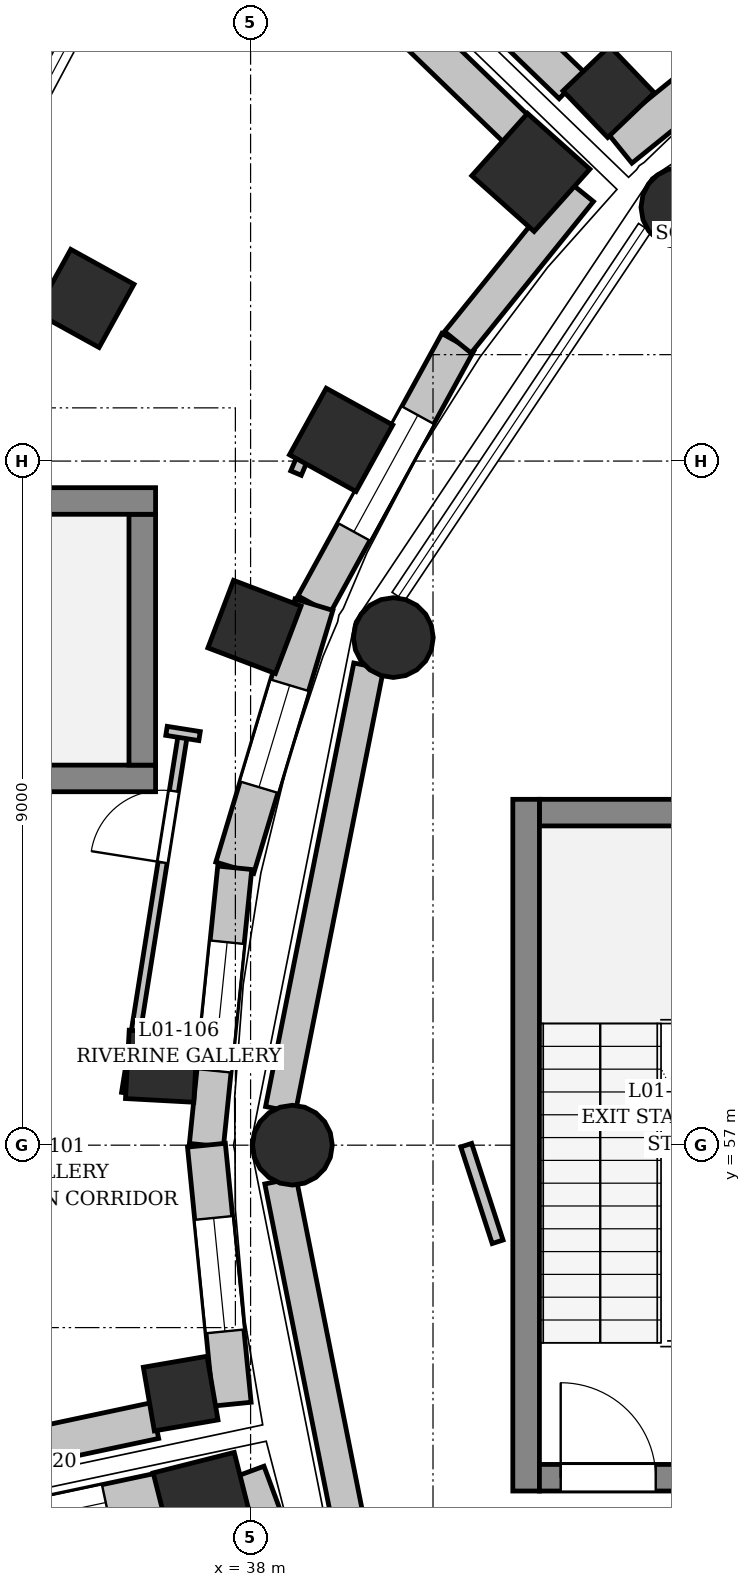
"""IFC4 building model, lengths in metres.
Left out: names, types, materials, properties, quantities, classifications, styles, units other than length and angle.
Written with IfcOpenShell. Run it as: python <this file> out.ifc"""

import sys

from ifc_helpers import new_model, si_unit, direction, frame, frame_2d, origin, origin_2d, place, context, subcontext, project, spatial, rectangle, circle, extrude, element, fill, save


model = new_model("IFC4")
c1 = context("Model", 3, precision=1e-05, world=origin(), true_north=direction((0.0, 1.0)))
c2 = subcontext(c1, "Body", "Model", "MODEL_VIEW")
j1 = project(units=[si_unit("LENGTHUNIT", "METRE"), si_unit("PLANEANGLEUNIT", "RADIAN")], contexts=[c1])
p1 = place(None, origin())
s1 = spatial("IfcSite", under=j1, at=p1, CompositionType="ELEMENT")
p2 = place(p1, origin())
s2 = spatial("IfcBuilding", under=s1, at=p2, CompositionType="ELEMENT")
p3 = place(p2, origin())
s3 = spatial("IfcBuildingStorey", under=s2, at=p3, CompositionType="ELEMENT", Elevation=0.0)
for number, where, z_axis, x_axis in (
    (1, (43.661, 69.339, 0.0), (0.0, 0.0, 1.0), (-0.707, 0.707, 0.0)),
    (2, (39.878, 63.678, 0.0), (0.0, 0.0, 1.0), (-0.924, 0.383, 0.0)),
    (3, (38.55, 57.0, 0.0), (0.0, 0.0, 1.0), (-1.0, 0.0, 0.0)),
):
    element("IfcColumn", number, at=place(p3, frame(where, z_axis=z_axis, x_axis=x_axis)), inside=s3, PredefinedType="COLUMN", context=c2, shape_type="SweptSolid", body=[
        extrude(circle(Radius=0.525, at=origin_2d()), origin(), (0.0, 0.0, 1.0), 5.05),
    ])
p4 = place(p3, frame((37.387, 52.29, 0.0), z_axis=(0.0, 0.0, 1.0), x_axis=(-0.969445349895, -0.245307385879, 0.0)))
e4 = element("IfcColumn", 4, at=p4, inside=s3, PredefinedType="COLUMN", context=c2, shape_type="SweptSolid", body=[
    extrude(rectangle(XDim=1.1, YDim=1.1, at=origin_2d()), origin(), (0.0, 0.0, 1.0), 5.12),
])
p5 = place(p3, frame((41.687, 69.797, 0.0), z_axis=(0.0, 0.0, 1.0), x_axis=(-0.745475999683, 0.666532470249, 0.0)))
e5 = element("IfcColumn", 5, at=p5, inside=s3, PredefinedType="COLUMN", context=c2, shape_type="SweptSolid", body=[
    extrude(rectangle(XDim=1.1, YDim=1.1, at=origin_2d()), origin(), (0.0, 0.0, 1.0), 5.1),
])
p6 = place(p3, frame((39.191, 66.279, 0.0), z_axis=(0.0, 0.0, 1.0), x_axis=(-0.875464527, 0.483282383255, 0.0)))
e6 = element("IfcColumn", 6, at=p6, inside=s3, PredefinedType="COLUMN", context=c2, shape_type="SweptSolid", body=[
    extrude(rectangle(XDim=1.0, YDim=1.0, at=origin_2d()), origin(), (0.0, 0.0, 1.0), 5.1),
])
for number, where, z_axis, x_axis in (
    (7, (35.821, 68.14, 0.0), (0.0, 0.0, 1.0), (-0.875, 0.483, 0.0)),
    (8, (38.051, 63.818, 0.0), (0.0, 0.0, 1.0), (-0.935, 0.355, 0.0)),
):
    element("IfcColumn", number, at=place(p3, frame(where, z_axis=z_axis, x_axis=x_axis)), inside=s3, PredefinedType="COLUMN", context=c2, shape_type="SweptSolid", body=[
        extrude(rectangle(XDim=0.95, YDim=0.95, at=origin_2d()), origin(), (0.0, 0.0, 1.0), 5.1),
    ])
p7 = place(p3, frame((36.828, 58.038, 0.0), z_axis=(0.0, 0.0, 1.0), x_axis=(-0.998536670326, 0.054078812985, 0.0)))
e9 = element("IfcColumn", 9, at=p7, inside=s3, PredefinedType="COLUMN", context=c2, shape_type="SweptSolid", body=[
    extrude(rectangle(XDim=0.9, YDim=0.9, at=origin_2d()), origin(), (0.0, 0.0, 1.0), 5.1),
])
for number, where, z_axis, x_axis in (
    (10, (37.08, 53.732, 0.0), (0.0, 0.0, 1.0), (-0.985, -0.17, 0.0)),
    (11, (42.711, 70.858, 0.0), (0.0, 0.0, 1.0), (-0.692, 0.722, 0.0)),
):
    element("IfcColumn", number, at=place(p3, frame(where, z_axis=z_axis, x_axis=x_axis)), inside=s3, PredefinedType="COLUMN", context=c2, shape_type="SweptSolid", body=[
        extrude(rectangle(XDim=0.85, YDim=0.85, at=origin_2d()), origin(), (0.0, 0.0, 1.0), 5.1),
    ])
p8 = place(p3, frame((38.393, 57.469, 0.0), z_axis=(0.0, 0.0, 1.0), x_axis=(0.19507439879, 0.980788447596, 0.0)))
e12 = element("IfcWall", 12, at=p8, inside=s3, PredefinedType="SOLIDWALL", context=c2, shape_type="SweptSolid", body=[
    extrude(rectangle(XDim=5.95, YDim=0.4, at=frame_2d((2.975, 0.0))), origin(), (0.0, 0.0, 1.0), 4.55),
])
p9 = place(p3, frame((39.554, 50.696, 0.0), z_axis=(0.0, 0.0, 1.0), x_axis=(-0.19507439879, 0.980788447596, 0.0)))
e13 = element("IfcWall", 13, at=p9, inside=s3, PredefinedType="SOLIDWALL", context=c2, shape_type="SweptSolid", body=[
    extrude(rectangle(XDim=5.95, YDim=0.42, at=frame_2d((2.975, 0.0))), origin(), (0.0, 0.0, 1.0), 4.54),
])
p10 = place(p3, frame((37.951, 52.693, 0.0), z_axis=(0.0, 0.0, 1.0), x_axis=(0.346456169042, -0.938066161277, 0.0)))
e14 = element("IfcWall", 14, at=p10, inside=s3, PredefinedType="SOLIDWALL", context=c2, shape_type="SweptSolid", body=[
    extrude(rectangle(XDim=4.55, YDim=0.48, at=frame_2d((2.275, 0.0))), origin(), (0.0, 0.0, 1.0), 5.12),
])
p11 = place(p10, frame((2.205, 0.0, 0.9)))
e15 = element("IfcOpeningElement", 15, at=p11, cuts=e14, PredefinedType="OPENING", context=c2, shape_type="SweptSolid", body=[
    extrude(rectangle(XDim=1.7, YDim=1.55, at=frame_2d((0.85, 0.775))), frame((0.0, 0.25, 0.0), z_axis=(0.0, -1.0, 0.0), x_axis=(1.0, 0.0, 0.0)), (0.0, 0.0, 1.0), 0.5),
])
p12 = place(p3, frame((34.01, 51.856, 0.0), z_axis=(0.0, 0.0, 1.0), x_axis=(0.97815429803, 0.207880180021, 0.0)))
e16 = element("IfcWall", 16, at=p12, inside=s3, PredefinedType="SOLIDWALL", context=c2, shape_type="SweptSolid", body=[
    extrude(rectangle(XDim=2.862, YDim=0.48, at=frame_2d((1.431, 0.0))), origin(), (0.0, 0.0, 1.0), 3.91),
])
p13 = place(p12, frame((0.731, 0.0, 0.9)))
e17 = element("IfcOpeningElement", 17, at=p13, cuts=e16, PredefinedType="OPENING", context=c2, shape_type="SweptSolid", body=[
    extrude(rectangle(XDim=1.4, YDim=2.05, at=frame_2d((0.7, 1.025))), frame((0.0, 0.25, 0.0), z_axis=(0.0, -1.0, 0.0), x_axis=(1.0, 0.0, 0.0)), (0.0, 0.0, 1.0), 0.5),
])
p14 = place(p3, frame((40.726, 67.563, 0.0), z_axis=(0.0, 0.0, 1.0), x_axis=(-0.480801851499, -0.876829276196, 0.0)))
e18 = element("IfcWall", 18, at=p14, inside=s3, PredefinedType="SOLIDWALL", context=c2, shape_type="SweptSolid", body=[
    extrude(rectangle(XDim=3.937, YDim=0.48, at=frame_2d((1.968, 0.0))), origin(), (0.0, 0.0, 1.0), 5.1),
])
p15 = place(p14, frame((1.094, 0.0, 0.9)))
e19 = element("IfcOpeningElement", 19, at=p15, cuts=e18, PredefinedType="OPENING", context=c2, shape_type="SweptSolid", body=[
    extrude(rectangle(XDim=1.75, YDim=1.85, at=frame_2d((0.875, 0.925))), frame((0.0, 0.25, 0.0), z_axis=(0.0, -1.0, 0.0), x_axis=(1.0, 0.0, 0.0)), (0.0, 0.0, 1.0), 0.5),
])
p16 = place(p3, frame((38.833, 64.111, 0.0), z_axis=(0.0, 0.0, 1.0), x_axis=(-0.288190467342, -0.957573106626, 0.0)))
e20 = element("IfcWall", 20, at=p16, inside=s3, PredefinedType="SOLIDWALL", context=c2, shape_type="SweptSolid", body=[
    extrude(rectangle(XDim=3.615, YDim=0.52, at=frame_2d((1.807, 0.0))), origin(), (0.0, 0.0, 1.0), 4.44),
])
p17 = place(p16, frame((1.107, 0.0, 0.9)))
e21 = element("IfcOpeningElement", 21, at=p17, cuts=e20, PredefinedType="OPENING", context=c2, shape_type="SweptSolid", body=[
    extrude(rectangle(XDim=1.4, YDim=2.05, at=frame_2d((0.7, 1.025))), frame((0.0, 0.27, 0.0), z_axis=(0.0, -1.0, 0.0), x_axis=(1.0, 0.0, 0.0)), (0.0, 0.0, 1.0), 0.54),
])
p18 = place(p3, frame((37.792, 60.649, 0.0), z_axis=(0.0, 0.0, 1.0), x_axis=(-0.101618529077, -0.994823438882, 0.0)))
e22 = element("IfcWall", 22, at=p18, inside=s3, PredefinedType="SOLIDWALL", context=c2, shape_type="SweptSolid", body=[
    extrude(rectangle(XDim=3.669, YDim=0.45, at=frame_2d((1.834, 0.0))), origin(), (0.0, 0.0, 1.0), 4.44),
])
p19 = place(p18, frame((0.984, 0.0, 0.9)))
e23 = element("IfcOpeningElement", 23, at=p19, cuts=e22, PredefinedType="OPENING", context=c2, shape_type="SweptSolid", body=[
    extrude(rectangle(XDim=1.7, YDim=1.55, at=frame_2d((0.85, 0.775))), frame((0.0, 0.235, 0.0), z_axis=(0.0, -1.0, 0.0), x_axis=(1.0, 0.0, 0.0)), (0.0, 0.0, 1.0), 0.47),
])
p20 = place(p3, frame((37.419, 57.0, 0.0), z_axis=(0.0, 0.0, 1.0), x_axis=(0.09912244439, -0.995075243898, 0.0)))
e24 = element("IfcWall", 24, at=p20, inside=s3, PredefinedType="SOLIDWALL", context=c2, shape_type="SweptSolid", body=[
    extrude(rectangle(XDim=3.424, YDim=0.5, at=frame_2d((1.712, 0.0))), origin(), (0.0, 0.0, 1.0), 5.1),
])
p21 = place(p20, frame((0.962, 0.0, 0.9)))
e25 = element("IfcOpeningElement", 25, at=p21, cuts=e24, PredefinedType="OPENING", context=c2, shape_type="SweptSolid", body=[
    extrude(rectangle(XDim=1.5, YDim=2.1, at=frame_2d((0.75, 1.05))), frame((0.0, 0.26, 0.0), z_axis=(0.0, -1.0, 0.0), x_axis=(1.0, 0.0, 0.0)), (0.0, 0.0, 1.0), 0.52),
])
p22 = place(p3, frame((36.741, 53.377, 0.0), z_axis=(0.0, 0.0, 1.0), x_axis=(-0.978142239511, -0.207936911788, 0.0)))
e26 = element("IfcWall", 26, at=p22, inside=s3, PredefinedType="SOLIDWALL", context=c2, shape_type="SweptSolid", body=[
    extrude(rectangle(XDim=7.248, YDim=0.48, at=frame_2d((3.624, 0.0))), origin(), (0.0, 0.0, 1.0), 4.19),
])
p23 = place(p22, frame((3.504, 0.0, 0.9)))
e27 = element("IfcOpeningElement", 27, at=p23, cuts=e26, PredefinedType="OPENING", context=c2, shape_type="SweptSolid", body=[
    extrude(rectangle(XDim=1.8, YDim=2.1, at=frame_2d((0.9, 1.05))), frame((0.0, 0.25, 0.0), z_axis=(0.0, -1.0, 0.0), x_axis=(1.0, 0.0, 0.0)), (0.0, 0.0, 1.0), 0.5),
])
p24 = place(p3, frame((39.438, 72.354, 0.0), z_axis=(0.0, 0.0, 1.0), x_axis=(0.719325028511, -0.694673666809, 0.0)))
e28 = element("IfcWall", 28, at=p24, inside=s3, PredefinedType="SOLIDWALL", context=c2, shape_type="SweptSolid", body=[
    extrude(rectangle(XDim=2.862, YDim=0.48, at=frame_2d((1.431, 0.0))), origin(), (0.0, 0.0, 1.0), 3.89),
])
p25 = place(p3, frame((42.336, 69.556, 0.0), z_axis=(0.0, 0.0, 1.0), x_axis=(-0.6281751712, -0.77807194673, 0.0)))
e29 = element("IfcWall", 29, at=p25, inside=s3, PredefinedType="SOLIDWALL", context=c2, shape_type="SweptSolid", body=[
    extrude(rectangle(XDim=2.562, YDim=0.45, at=frame_2d((1.281, 0.0))), origin(), (0.0, 0.0, 1.0), 5.1),
])
p26 = place(p3, frame((42.226, 70.94, 0.0), z_axis=(0.0, 0.0, 1.0), x_axis=(-0.719340699073, 0.694657439791, 0.0)))
e30 = element("IfcWall", 30, at=p26, inside=s3, PredefinedType="SOLIDWALL", context=c2, shape_type="SweptSolid", body=[
    extrude(rectangle(XDim=11.909, YDim=0.48, at=frame_2d((5.954, 0.0))), origin(), (0.0, 0.0, 1.0), 4.19),
])
p27 = place(p26, frame((4.234, 0.0, 0.9)))
e31 = element("IfcOpeningElement", 31, at=p27, cuts=e30, PredefinedType="OPENING", context=c2, shape_type="SweptSolid", body=[
    extrude(rectangle(XDim=1.4, YDim=2.05, at=frame_2d((0.7, 1.025))), frame((0.0, 0.25, 0.0), z_axis=(0.0, -1.0, 0.0), x_axis=(1.0, 0.0, 0.0)), (0.0, 0.0, 1.0), 0.5),
])
p28 = place(p26, frame((7.054, 0.0, 0.9)))
e32 = element("IfcOpeningElement", 32, at=p28, cuts=e30, PredefinedType="OPENING", context=c2, shape_type="SweptSolid", body=[
    extrude(rectangle(XDim=1.4, YDim=2.05, at=frame_2d((0.7, 1.025))), frame((0.0, 0.25, 0.0), z_axis=(0.0, -1.0, 0.0), x_axis=(1.0, 0.0, 0.0)), (0.0, 0.0, 1.0), 0.5),
])
p29 = place(p3, frame((45.886, 72.574, 0.0), z_axis=(0.0, 0.0, 1.0), x_axis=(-0.777517372915, -0.628861459159, 0.0)))
e33 = element("IfcWall", 33, at=p29, inside=s3, PredefinedType="SOLIDWALL", context=c2, shape_type="SweptSolid", body=[
    extrude(rectangle(XDim=3.9, YDim=0.52, at=frame_2d((1.95, 0.0))), origin(), (0.0, 0.0, 1.0), 5.1),
])
p30 = place(p29, frame((1.098, 0.0, 0.9)))
e34 = element("IfcOpeningElement", 34, at=p30, cuts=e33, PredefinedType="OPENING", context=c2, shape_type="SweptSolid", body=[
    extrude(rectangle(XDim=1.55, YDim=1.85, at=frame_2d((0.775, 0.925))), frame((0.0, 0.27, 0.0), z_axis=(0.0, -1.0, 0.0), x_axis=(1.0, 0.0, 0.0)), (0.0, 0.0, 1.0), 0.54),
])
p31 = place(p3, frame((45.2, 61.375, 0.0), z_axis=(0.0, 0.0, 1.0), x_axis=(-1.0, 0.0, 0.0)))
e35 = element("IfcWall", 35, at=p31, inside=s3, PredefinedType="SHEAR", context=c2, shape_type="SweptSolid", body=[
    extrude(rectangle(XDim=3.4, YDim=0.35, at=frame_2d((1.7, 0.0))), origin(), (0.0, 0.0, 1.0), 5.05),
])
p32 = place(p3, frame((41.625, 61.55, 0.0), z_axis=(0.0, 0.0, 1.0), x_axis=(0.0, -1.0, 0.0)))
e36 = element("IfcWall", 36, at=p32, inside=s3, PredefinedType="SHEAR", context=c2, shape_type="SweptSolid", body=[
    extrude(rectangle(XDim=9.1, YDim=0.35, at=frame_2d((4.55, 0.0))), origin(), (0.0, 0.0, 1.0), 5.05),
])
p33 = place(p3, frame((41.8, 52.625, 0.0), z_axis=(0.0, 0.0, 1.0), x_axis=(1.0, 0.0, 0.0)))
e37 = element("IfcWall", 37, at=p33, inside=s3, PredefinedType="SHEAR", context=c2, shape_type="SweptSolid", body=[
    extrude(rectangle(XDim=3.4, YDim=0.35, at=frame_2d((1.7, 0.0))), origin(), (0.0, 0.0, 1.0), 5.05),
])
p34 = place(p33, frame((0.28, 0.0, 0.0)))
e38 = element("IfcOpeningElement", 38, at=p34, cuts=e37, PredefinedType="OPENING", context=c2, shape_type="SweptSolid", body=[
    extrude(rectangle(XDim=1.25, YDim=2.2, at=frame_2d((0.625, 1.1))), frame((0.0, 0.185, 0.0), z_axis=(0.0, -1.0, 0.0), x_axis=(1.0, 0.0, 0.0)), (0.0, 0.0, 1.0), 0.37),
])
p35 = place(p3, frame((27.65, 61.825, 0.0), z_axis=(0.0, 0.0, 1.0), x_axis=(1.0, 0.0, 0.0)))
e39 = element("IfcWall", 39, at=p35, inside=s3, PredefinedType="SHEAR", context=c2, shape_type="SweptSolid", body=[
    extrude(rectangle(XDim=9.1, YDim=0.35, at=frame_2d((4.55, 0.0))), origin(), (0.0, 0.0, 1.0), 5.1),
])
p36 = place(p3, frame((36.575, 62.0, 0.0), z_axis=(0.0, 0.0, 1.0), x_axis=(0.0, 1.0, 0.0)))
e40 = element("IfcWall", 40, at=p36, inside=s3, PredefinedType="SHEAR", context=c2, shape_type="SweptSolid", body=[
    extrude(rectangle(XDim=3.3, YDim=0.35, at=frame_2d((1.65, 0.0))), origin(), (0.0, 0.0, 1.0), 5.1),
])
p37 = place(p3, frame((36.75, 65.475, 0.0), z_axis=(0.0, 0.0, 1.0), x_axis=(-1.0, 0.0, 0.0)))
e41 = element("IfcWall", 41, at=p37, inside=s3, PredefinedType="SHEAR", context=c2, shape_type="SweptSolid", body=[
    extrude(rectangle(XDim=9.1, YDim=0.35, at=frame_2d((4.55, 0.0))), origin(), (0.0, 0.0, 1.0), 5.1),
])
p38 = place(p3, frame((41.25, 55.729, 0.0), z_axis=(0.0, 0.0, 1.0), x_axis=(-0.30898696848, 0.951066271776, 0.0)))
e42 = element("IfcWall", 42, at=p38, inside=s3, PredefinedType="PARTITIONING", context=c2, shape_type="SweptSolid", body=[
    extrude(rectangle(XDim=1.337, YDim=0.15, at=frame_2d((0.668, 0.0))), origin(), (0.0, 0.0, 1.0), 4.95),
])
p39 = place(p3, frame((36.362, 57.686, 0.0), z_axis=(0.0, 0.0, 1.0), x_axis=(0.156391852422, 0.987695088829, 0.0)))
e43 = element("IfcWall", 43, at=p39, inside=s3, PredefinedType="PARTITIONING", context=c2, shape_type="SweptSolid", body=[
    extrude(rectangle(XDim=4.789, YDim=0.12, at=frame_2d((2.395, 0.0))), origin(), (0.0, 0.0, 1.0), 4.09),
])
p40 = place(p39, frame((3.072, 0.0, 0.0)))
e44 = element("IfcOpeningElement", 44, at=p40, cuts=e43, PredefinedType="OPENING", context=c2, shape_type="SweptSolid", body=[
    extrude(rectangle(XDim=0.95, YDim=2.2, at=frame_2d((0.475, 1.1))), frame((0.0, 0.07, 0.0), z_axis=(0.0, -1.0, 0.0), x_axis=(1.0, 0.0, 0.0)), (0.0, 0.0, 1.0), 0.14),
])
p41 = place(p3, frame((39.009, 66.81, 0.0), z_axis=(0.0, 0.0, 1.0), x_axis=(-0.390722739326, -0.920508414396, 0.0)))
e45 = element("IfcWall", 45, at=p41, inside=s3, PredefinedType="PARTITIONING", context=c2, shape_type="SweptSolid", body=[
    extrude(rectangle(XDim=1.052, YDim=0.15, at=frame_2d((0.526, 0.0))), origin(), (0.0, 0.0, 1.0), 3.99),
])
p42 = place(p3, frame((37.329, 62.382, 0.0), z_axis=(0.0, 0.0, 1.0), x_axis=(-0.987695424831, 0.156389730378, 0.0)))
e46 = element("IfcWall", 46, at=p42, inside=s3, PredefinedType="PARTITIONING", context=c2, shape_type="SweptSolid", body=[
    extrude(rectangle(XDim=0.44, YDim=0.12, at=frame_2d((0.22, 0.0))), origin(), (0.0, 0.0, 1.0), 5.1),
])
p43 = place(p13, origin())
e47 = element("IfcWindow", 47, at=p43, inside=s3, PartitioningType="DOUBLE_PANEL_VERTICAL", PredefinedType="WINDOW", context=c2, shape_type="SweptSolid", body=[
    extrude(rectangle(XDim=1.4, YDim=2.05, at=frame_2d((0.7, 1.025))), frame((0.0, 0.03, 0.0), z_axis=(0.0, -1.0, 0.0), x_axis=(1.0, 0.0, 0.0)), (0.0, 0.0, 1.0), 0.06),
])
fill(e17, e47)
p44 = place(p15, origin())
e48 = element("IfcWindow", 48, at=p44, inside=s3, PartitioningType="DOUBLE_PANEL_VERTICAL", PredefinedType="WINDOW", context=c2, shape_type="SweptSolid", body=[
    extrude(rectangle(XDim=1.75, YDim=1.85, at=frame_2d((0.875, 0.925))), frame((0.0, 0.03, 0.0), z_axis=(0.0, -1.0, 0.0), x_axis=(1.0, 0.0, 0.0)), (0.0, 0.0, 1.0), 0.06),
])
fill(e19, e48)
p45 = place(p17, origin())
e49 = element("IfcWindow", 49, at=p45, inside=s3, PartitioningType="DOUBLE_PANEL_VERTICAL", PredefinedType="WINDOW", context=c2, shape_type="SweptSolid", body=[
    extrude(rectangle(XDim=1.4, YDim=2.05, at=frame_2d((0.7, 1.025))), frame((0.0, 0.03, 0.0), z_axis=(0.0, -1.0, 0.0), x_axis=(1.0, 0.0, 0.0)), (0.0, 0.0, 1.0), 0.06),
])
fill(e21, e49)
p46 = place(p19, origin())
e50 = element("IfcWindow", 50, at=p46, inside=s3, PartitioningType="DOUBLE_PANEL_VERTICAL", PredefinedType="WINDOW", context=c2, shape_type="SweptSolid", body=[
    extrude(rectangle(XDim=1.7, YDim=1.55, at=frame_2d((0.85, 0.775))), frame((0.0, 0.03, 0.0), z_axis=(0.0, -1.0, 0.0), x_axis=(1.0, 0.0, 0.0)), (0.0, 0.0, 1.0), 0.06),
])
fill(e23, e50)
p47 = place(p21, origin())
e51 = element("IfcWindow", 51, at=p47, inside=s3, PartitioningType="DOUBLE_PANEL_VERTICAL", PredefinedType="WINDOW", context=c2, shape_type="SweptSolid", body=[
    extrude(rectangle(XDim=1.5, YDim=2.1, at=frame_2d((0.75, 1.05))), frame((0.0, 0.03, 0.0), z_axis=(0.0, -1.0, 0.0), x_axis=(1.0, 0.0, 0.0)), (0.0, 0.0, 1.0), 0.06),
])
fill(e25, e51)
p48 = place(p34, origin())
e52 = element("IfcDoor", 52, at=p48, inside=s3, OperationType="SINGLE_SWING_RIGHT", PredefinedType="DOOR", context=c2, shape_type="SweptSolid", body=[
    extrude(rectangle(XDim=1.25, YDim=2.2, at=frame_2d((0.625, 1.1))), frame((0.0, 0.025, 0.0), z_axis=(0.0, -1.0, 0.0), x_axis=(1.0, 0.0, 0.0)), (0.0, 0.0, 1.0), 0.05),
])
fill(e38, e52)
p49 = place(p40, origin())
e53 = element("IfcDoor", 53, at=p49, inside=s3, OperationType="SINGLE_SWING_RIGHT", PredefinedType="DOOR", context=c2, shape_type="SweptSolid", body=[
    extrude(rectangle(XDim=0.95, YDim=2.2, at=frame_2d((0.475, 1.1))), frame((0.0, 0.025, 0.0), z_axis=(0.0, -1.0, 0.0), x_axis=(1.0, 0.0, 0.0)), (0.0, 0.0, 1.0), 0.05),
])
fill(e44, e53)
save(model, sys.argv[1])
